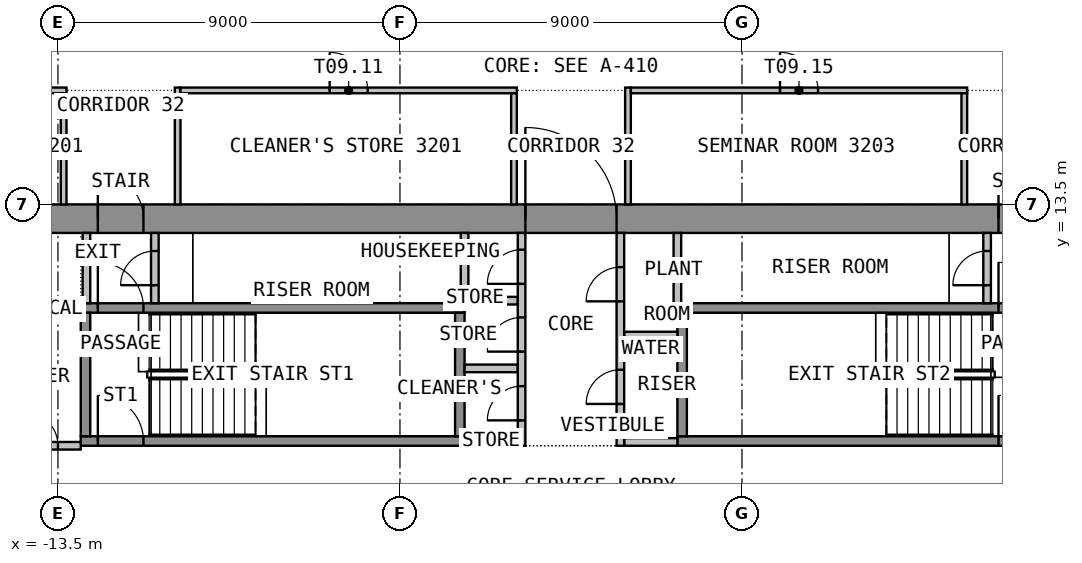
"""IFC4 building model, lengths in metres.
Left out: names, types, materials, properties, quantities, classifications, styles, units other than length and angle.
Written with IfcOpenShell. Run it as: python <this file> out.ifc"""

import sys

from ifc_helpers import new_model, si_unit, direction, frame, frame_2d, origin, place, context, subcontext, project, spatial, rectangle, extrude, element, fill, save


model = new_model("IFC4")
c1 = context("Model", 3, precision=1e-05, world=origin(), true_north=direction((0.0, 1.0)))
c2 = subcontext(c1, "Body", "Model", "MODEL_VIEW")
j1 = project(units=[si_unit("LENGTHUNIT", "METRE"), si_unit("PLANEANGLEUNIT", "RADIAN")], contexts=[c1])
p1 = place(None, origin())
s1 = spatial("IfcSite", under=j1, at=p1, CompositionType="ELEMENT")
p2 = place(p1, origin())
s2 = spatial("IfcBuilding", under=s1, at=p2, CompositionType="ELEMENT")
p3 = place(p2, frame((0.0, 0.0, 132.6)))
s3 = spatial("IfcBuildingStorey", under=s2, at=p3, CompositionType="ELEMENT", Elevation=132.6)
p4 = place(p3, frame((-15.75, 13.125, 0.0), z_axis=(0.0, 0.0, 1.0), x_axis=(1.0, 0.0, 0.0)))
e1 = element("IfcWall", 1, at=p4, inside=s3, PredefinedType="SHEAR", context=c2, shape_type="SweptSolid", body=[
    extrude(rectangle(XDim=31.5, YDim=0.75, at=frame_2d((15.75, 0.0))), origin(), (0.0, 0.0, 1.0), 3.575),
])
p5 = place(p4, frame((14.55, 0.0, 0.0)))
e2 = element("IfcOpeningElement", 2, at=p5, cuts=e1, PredefinedType="OPENING", context=c2, shape_type="SweptSolid", body=[
    extrude(rectangle(XDim=2.4, YDim=2.1, at=frame_2d((1.2, 1.05))), frame((0.0, 0.385, 0.0), z_axis=(0.0, -1.0, 0.0), x_axis=(1.0, 0.0, 0.0)), (0.0, 0.0, 1.0), 0.77),
])
p6 = place(p4, frame((3.3, 0.0, 0.0)))
e3 = element("IfcOpeningElement", 3, at=p6, cuts=e1, PredefinedType="OPENING", context=c2, shape_type="SweptSolid", body=[
    extrude(rectangle(XDim=1.2, YDim=2.1, at=frame_2d((0.6, 1.05))), frame((0.0, 0.385, 0.0), z_axis=(0.0, -1.0, 0.0), x_axis=(1.0, 0.0, 0.0)), (0.0, 0.0, 1.0), 0.77),
])
p7 = place(p4, frame((27.0, 0.0, 0.0)))
e4 = element("IfcOpeningElement", 4, at=p7, cuts=e1, PredefinedType="OPENING", context=c2, shape_type="SweptSolid", body=[
    extrude(rectangle(XDim=1.2, YDim=2.1, at=frame_2d((0.6, 1.05))), frame((0.0, 0.385, 0.0), z_axis=(0.0, -1.0, 0.0), x_axis=(1.0, 0.0, 0.0)), (0.0, 0.0, 1.0), 0.77),
])
p8 = place(p3, frame((-12.9, 7.275, 0.0), z_axis=(0.0, 0.0, 1.0), x_axis=(1.0, 0.0, 0.0)))
e5 = element("IfcWall", 5, at=p8, inside=s3, PredefinedType="SHEAR", context=c2, shape_type="SweptSolid", body=[
    extrude(rectangle(XDim=10.1, YDim=0.25, at=frame_2d((5.05, 0.0))), origin(), (0.0, 0.0, 1.0), 3.575),
])
p9 = place(p8, frame((0.45, 0.0, 0.0)))
e6 = element("IfcOpeningElement", 6, at=p9, cuts=e5, PredefinedType="OPENING", context=c2, shape_type="SweptSolid", body=[
    extrude(rectangle(XDim=1.2, YDim=2.1, at=frame_2d((0.6, 1.05))), frame((0.0, 0.135, 0.0), z_axis=(0.0, -1.0, 0.0), x_axis=(1.0, 0.0, 0.0)), (0.0, 0.0, 1.0), 0.27),
])
p10 = place(p3, frame((-12.9, 10.775, 0.0), z_axis=(0.0, 0.0, 1.0), x_axis=(1.0, 0.0, 0.0)))
e7 = element("IfcWall", 7, at=p10, inside=s3, PredefinedType="SHEAR", context=c2, shape_type="SweptSolid", body=[
    extrude(rectangle(XDim=10.1, YDim=0.25, at=frame_2d((5.05, 0.0))), origin(), (0.0, 0.0, 1.0), 3.575),
])
p11 = place(p10, frame((0.45, 0.0, 0.0)))
e8 = element("IfcOpeningElement", 8, at=p11, cuts=e7, PredefinedType="OPENING", context=c2, shape_type="SweptSolid", body=[
    extrude(rectangle(XDim=1.2, YDim=2.1, at=frame_2d((0.6, 1.05))), frame((0.0, 0.135, 0.0), z_axis=(0.0, -1.0, 0.0), x_axis=(1.0, 0.0, 0.0)), (0.0, 0.0, 1.0), 0.27),
])
for number, where, z_axis, x_axis in (
    (9, (-12.775, 7.4, 0.0), (0.0, 0.0, 1.0), (0.0, 1.0, 0.0)),
    (10, (-2.925, 7.4, 0.0), (0.0, 0.0, 1.0), (0.0, 1.0, 0.0)),
):
    element("IfcWall", number, at=place(p3, frame(where, z_axis=z_axis, x_axis=x_axis)), inside=s3, PredefinedType="SHEAR", context=c2, shape_type="SweptSolid", body=[
        extrude(rectangle(XDim=3.25, YDim=0.25, at=frame_2d((1.625, 0.0))), origin(), (0.0, 0.0, 1.0), 3.575),
    ])
p12 = place(p3, frame((2.8, 7.275, 0.0), z_axis=(0.0, 0.0, 1.0), x_axis=(1.0, 0.0, 0.0)))
e11 = element("IfcWall", 11, at=p12, inside=s3, PredefinedType="SHEAR", context=c2, shape_type="SweptSolid", body=[
    extrude(rectangle(XDim=10.1, YDim=0.25, at=frame_2d((5.05, 0.0))), origin(), (0.0, 0.0, 1.0), 3.575),
])
p13 = place(p12, frame((8.45, 0.0, 0.0)))
e12 = element("IfcOpeningElement", 12, at=p13, cuts=e11, PredefinedType="OPENING", context=c2, shape_type="SweptSolid", body=[
    extrude(rectangle(XDim=1.2, YDim=2.1, at=frame_2d((0.6, 1.05))), frame((0.0, 0.135, 0.0), z_axis=(0.0, -1.0, 0.0), x_axis=(1.0, 0.0, 0.0)), (0.0, 0.0, 1.0), 0.27),
])
p14 = place(p3, frame((2.8, 10.775, 0.0), z_axis=(0.0, 0.0, 1.0), x_axis=(1.0, 0.0, 0.0)))
e13 = element("IfcWall", 13, at=p14, inside=s3, PredefinedType="SHEAR", context=c2, shape_type="SweptSolid", body=[
    extrude(rectangle(XDim=10.1, YDim=0.25, at=frame_2d((5.05, 0.0))), origin(), (0.0, 0.0, 1.0), 3.575),
])
p15 = place(p14, frame((8.45, 0.0, 0.0)))
e14 = element("IfcOpeningElement", 14, at=p15, cuts=e13, PredefinedType="OPENING", context=c2, shape_type="SweptSolid", body=[
    extrude(rectangle(XDim=1.2, YDim=2.1, at=frame_2d((0.6, 1.05))), frame((0.0, 0.135, 0.0), z_axis=(0.0, -1.0, 0.0), x_axis=(1.0, 0.0, 0.0)), (0.0, 0.0, 1.0), 0.27),
])
p16 = place(p3, frame((2.925, 7.4, 0.0), z_axis=(0.0, 0.0, 1.0), x_axis=(0.0, 1.0, 0.0)))
e15 = element("IfcWall", 15, at=p16, inside=s3, PredefinedType="SHEAR", context=c2, shape_type="SweptSolid", body=[
    extrude(rectangle(XDim=3.25, YDim=0.25, at=frame_2d((1.625, 0.0))), origin(), (0.0, 0.0, 1.0), 3.575),
])
for number, where, z_axis, x_axis in (
    (16, (-2.8, 7.25, 0.0), (0.0, 0.0, 1.0), (1.0, 0.0, 0.0)),
    (17, (-2.8, 9.186, 0.0), (0.0, 0.0, 1.0), (1.0, 0.0, 0.0)),
    (18, (-2.8, 10.968, 0.0), (0.0, 0.0, 1.0), (1.0, 0.0, 0.0)),
    (19, (1.4, 7.25, 0.0), (0.0, 0.0, 1.0), (1.0, 0.0, 0.0)),
    (20, (1.4, 10.05, 0.0), (0.0, 0.0, 1.0), (1.0, 0.0, 0.0)),
):
    element("IfcWall", number, at=place(p3, frame(where, z_axis=z_axis, x_axis=x_axis)), inside=s3, PredefinedType="PARTITIONING", context=c2, shape_type="SweptSolid", body=[
        extrude(rectangle(XDim=1.4, YDim=0.2, at=frame_2d((0.7, 0.0))), origin(), (0.0, 0.0, 1.0), 3.575),
    ])
p17 = place(p3, frame((-1.3, 7.15, 0.0), z_axis=(0.0, 0.0, 1.0), x_axis=(0.0, 1.0, 0.0)))
e21 = element("IfcWall", 21, at=p17, inside=s3, PredefinedType="PARTITIONING", context=c2, shape_type="SweptSolid", body=[
    extrude(rectangle(XDim=5.6, YDim=0.2, at=frame_2d((2.8, 0.0))), origin(), (0.0, 0.0, 1.0), 3.575),
])
p18 = place(p17, frame((0.668, 0.0, 0.0)))
e22 = element("IfcOpeningElement", 22, at=p18, cuts=e21, PredefinedType="OPENING", context=c2, shape_type="SweptSolid", body=[
    extrude(rectangle(XDim=0.9, YDim=2.1, at=frame_2d((0.45, 1.05))), frame((0.0, 0.11, 0.0), z_axis=(0.0, -1.0, 0.0), x_axis=(1.0, 0.0, 0.0)), (0.0, 0.0, 1.0), 0.22),
])
p19 = place(p17, frame((2.477, 0.0, 0.0)))
e23 = element("IfcOpeningElement", 23, at=p19, cuts=e21, PredefinedType="OPENING", context=c2, shape_type="SweptSolid", body=[
    extrude(rectangle(XDim=0.9, YDim=2.1, at=frame_2d((0.45, 1.05))), frame((0.0, 0.11, 0.0), z_axis=(0.0, -1.0, 0.0), x_axis=(1.0, 0.0, 0.0)), (0.0, 0.0, 1.0), 0.22),
])
p20 = place(p17, frame((4.259, 0.0, 0.0)))
e24 = element("IfcOpeningElement", 24, at=p20, cuts=e21, PredefinedType="OPENING", context=c2, shape_type="SweptSolid", body=[
    extrude(rectangle(XDim=0.9, YDim=2.1, at=frame_2d((0.45, 1.05))), frame((0.0, 0.11, 0.0), z_axis=(0.0, -1.0, 0.0), x_axis=(1.0, 0.0, 0.0)), (0.0, 0.0, 1.0), 0.22),
])
p21 = place(p3, frame((1.3, 7.15, 0.0), z_axis=(0.0, 0.0, 1.0), x_axis=(0.0, 1.0, 0.0)))
e25 = element("IfcWall", 25, at=p21, inside=s3, PredefinedType="PARTITIONING", context=c2, shape_type="SweptSolid", body=[
    extrude(rectangle(XDim=5.6, YDim=0.2, at=frame_2d((2.8, 0.0))), origin(), (0.0, 0.0, 1.0), 3.575),
])
p22 = place(p21, frame((1.1, 0.0, 0.0)))
e26 = element("IfcOpeningElement", 26, at=p22, cuts=e25, PredefinedType="OPENING", context=c2, shape_type="SweptSolid", body=[
    extrude(rectangle(XDim=0.9, YDim=2.1, at=frame_2d((0.45, 1.05))), frame((0.0, 0.11, 0.0), z_axis=(0.0, -1.0, 0.0), x_axis=(1.0, 0.0, 0.0)), (0.0, 0.0, 1.0), 0.22),
])
p23 = place(p21, frame((3.8, 0.0, 0.0)))
e27 = element("IfcOpeningElement", 27, at=p23, cuts=e25, PredefinedType="OPENING", context=c2, shape_type="SweptSolid", body=[
    extrude(rectangle(XDim=0.9, YDim=2.1, at=frame_2d((0.45, 1.05))), frame((0.0, 0.11, 0.0), z_axis=(0.0, -1.0, 0.0), x_axis=(1.0, 0.0, 0.0)), (0.0, 0.0, 1.0), 0.22),
])
p24 = place(p3, frame((-12.75, 10.9, 0.0), z_axis=(0.0, 0.0, 1.0), x_axis=(0.0, 1.0, 0.0)))
e28 = element("IfcWall", 28, at=p24, inside=s3, PredefinedType="PARTITIONING", context=c2, shape_type="SweptSolid", body=[
    extrude(rectangle(XDim=1.85, YDim=0.2, at=frame_2d((0.925, 0.0))), origin(), (0.0, 0.0, 1.0), 3.575),
])
p25 = place(p3, frame((-10.95, 10.9, 0.0), z_axis=(0.0, 0.0, 1.0), x_axis=(0.0, 1.0, 0.0)))
e29 = element("IfcWall", 29, at=p25, inside=s3, PredefinedType="PARTITIONING", context=c2, shape_type="SweptSolid", body=[
    extrude(rectangle(XDim=1.85, YDim=0.2, at=frame_2d((0.925, 0.0))), origin(), (0.0, 0.0, 1.0), 3.575),
])
p26 = place(p25, frame((0.475, 0.0, 0.0)))
e30 = element("IfcOpeningElement", 30, at=p26, cuts=e29, PredefinedType="OPENING", context=c2, shape_type="SweptSolid", body=[
    extrude(rectangle(XDim=0.9, YDim=2.1, at=frame_2d((0.45, 1.05))), frame((0.0, 0.11, 0.0), z_axis=(0.0, -1.0, 0.0), x_axis=(1.0, 0.0, 0.0)), (0.0, 0.0, 1.0), 0.22),
])
p27 = place(p3, frame((10.95, 10.9, 0.0), z_axis=(0.0, 0.0, 1.0), x_axis=(0.0, 1.0, 0.0)))
e31 = element("IfcWall", 31, at=p27, inside=s3, PredefinedType="PARTITIONING", context=c2, shape_type="SweptSolid", body=[
    extrude(rectangle(XDim=1.85, YDim=0.2, at=frame_2d((0.925, 0.0))), origin(), (0.0, 0.0, 1.0), 3.575),
])
p28 = place(p27, frame((0.475, 0.0, 0.0)))
e32 = element("IfcOpeningElement", 32, at=p28, cuts=e31, PredefinedType="OPENING", context=c2, shape_type="SweptSolid", body=[
    extrude(rectangle(XDim=0.9, YDim=2.1, at=frame_2d((0.45, 1.05))), frame((0.0, 0.11, 0.0), z_axis=(0.0, -1.0, 0.0), x_axis=(1.0, 0.0, 0.0)), (0.0, 0.0, 1.0), 0.22),
])
p29 = place(p3, frame((-15.0, 7.15, 0.0), z_axis=(0.0, 0.0, 1.0), x_axis=(1.0, 0.0, 0.0)))
e33 = element("IfcWall", 33, at=p29, inside=s3, PredefinedType="PARTITIONING", context=c2, shape_type="SweptSolid", body=[
    extrude(rectangle(XDim=2.1, YDim=0.2, at=frame_2d((1.05, 0.0))), origin(), (0.0, 0.0, 1.0), 3.575),
])
p30 = place(p29, frame((0.6, 0.0, 0.0)))
e34 = element("IfcOpeningElement", 34, at=p30, cuts=e33, PredefinedType="OPENING", context=c2, shape_type="SweptSolid", body=[
    extrude(rectangle(XDim=0.9, YDim=2.1, at=frame_2d((0.45, 1.05))), frame((0.0, 0.11, 0.0), z_axis=(0.0, -1.0, 0.0), x_axis=(1.0, 0.0, 0.0)), (0.0, 0.0, 1.0), 0.22),
])
p31 = place(p3, frame((-18.675, 16.5, 0.0), z_axis=(0.0, 0.0, 1.0), x_axis=(1.0, 0.0, 0.0)))
e35 = element("IfcWall", 35, at=p31, inside=s3, PredefinedType="PARTITIONING", context=c2, shape_type="SweptSolid", body=[
    extrude(rectangle(XDim=5.4, YDim=0.15, at=frame_2d((2.7, 0.0))), origin(), (0.0, 0.0, 1.0), 3.575),
])
p32 = place(p31, frame((2.2, 0.0, 0.0)))
e36 = element("IfcOpeningElement", 36, at=p32, cuts=e35, PredefinedType="OPENING", context=c2, shape_type="SweptSolid", body=[
    extrude(rectangle(XDim=1.0, YDim=2.1, at=frame_2d((0.5, 1.05))), frame((0.0, 0.085, 0.0), z_axis=(0.0, -1.0, 0.0), x_axis=(1.0, 0.0, 0.0)), (0.0, 0.0, 1.0), 0.17),
])
p33 = place(p3, frame((-13.35, 16.425, 0.0), z_axis=(0.0, 0.0, 1.0), x_axis=(0.0, -1.0, 0.0)))
e37 = element("IfcWall", 37, at=p33, inside=s3, PredefinedType="PARTITIONING", context=c2, shape_type="SweptSolid", body=[
    extrude(rectangle(XDim=2.925, YDim=0.15, at=frame_2d((1.462, 0.0))), origin(), (0.0, 0.0, 1.0), 3.575),
])
p34 = place(p3, frame((-10.35, 13.5, 0.0), z_axis=(0.0, 0.0, 1.0), x_axis=(0.0, 1.0, 0.0)))
e38 = element("IfcWall", 38, at=p34, inside=s3, PredefinedType="PARTITIONING", context=c2, shape_type="SweptSolid", body=[
    extrude(rectangle(XDim=3.075, YDim=0.15, at=frame_2d((1.538, 0.0))), origin(), (0.0, 0.0, 1.0), 3.575),
])
p35 = place(p3, frame((-10.275, 16.5, 0.0), z_axis=(0.0, 0.0, 1.0), x_axis=(1.0, 0.0, 0.0)))
e39 = element("IfcWall", 39, at=p35, inside=s3, PredefinedType="PARTITIONING", context=c2, shape_type="SweptSolid", body=[
    extrude(rectangle(XDim=8.85, YDim=0.15, at=frame_2d((4.425, 0.0))), origin(), (0.0, 0.0, 1.0), 3.575),
])
p36 = place(p35, frame((3.925, 0.0, 0.0)))
e40 = element("IfcOpeningElement", 40, at=p36, cuts=e39, PredefinedType="OPENING", context=c2, shape_type="SweptSolid", body=[
    extrude(rectangle(XDim=1.0, YDim=2.1, at=frame_2d((0.5, 1.05))), frame((0.0, 0.085, 0.0), z_axis=(0.0, -1.0, 0.0), x_axis=(1.0, 0.0, 0.0)), (0.0, 0.0, 1.0), 0.17),
])
p37 = place(p3, frame((-1.5, 16.425, 0.0), z_axis=(0.0, 0.0, 1.0), x_axis=(0.0, -1.0, 0.0)))
e41 = element("IfcWall", 41, at=p37, inside=s3, PredefinedType="PARTITIONING", context=c2, shape_type="SweptSolid", body=[
    extrude(rectangle(XDim=2.925, YDim=0.15, at=frame_2d((1.462, 0.0))), origin(), (0.0, 0.0, 1.0), 3.575),
])
p38 = place(p3, frame((1.5, 13.5, 0.0), z_axis=(0.0, 0.0, 1.0), x_axis=(0.0, 1.0, 0.0)))
e42 = element("IfcWall", 42, at=p38, inside=s3, PredefinedType="PARTITIONING", context=c2, shape_type="SweptSolid", body=[
    extrude(rectangle(XDim=3.075, YDim=0.15, at=frame_2d((1.538, 0.0))), origin(), (0.0, 0.0, 1.0), 3.575),
])
p39 = place(p3, frame((1.575, 16.5, 0.0), z_axis=(0.0, 0.0, 1.0), x_axis=(1.0, 0.0, 0.0)))
e43 = element("IfcWall", 43, at=p39, inside=s3, PredefinedType="PARTITIONING", context=c2, shape_type="SweptSolid", body=[
    extrude(rectangle(XDim=8.85, YDim=0.15, at=frame_2d((4.425, 0.0))), origin(), (0.0, 0.0, 1.0), 3.575),
])
p40 = place(p39, frame((3.925, 0.0, 0.0)))
e44 = element("IfcOpeningElement", 44, at=p40, cuts=e43, PredefinedType="OPENING", context=c2, shape_type="SweptSolid", body=[
    extrude(rectangle(XDim=1.0, YDim=2.1, at=frame_2d((0.5, 1.05))), frame((0.0, 0.085, 0.0), z_axis=(0.0, -1.0, 0.0), x_axis=(1.0, 0.0, 0.0)), (0.0, 0.0, 1.0), 0.17),
])
p41 = place(p3, frame((10.35, 16.425, 0.0), z_axis=(0.0, 0.0, 1.0), x_axis=(0.0, -1.0, 0.0)))
e45 = element("IfcWall", 45, at=p41, inside=s3, PredefinedType="PARTITIONING", context=c2, shape_type="SweptSolid", body=[
    extrude(rectangle(XDim=2.925, YDim=0.15, at=frame_2d((1.462, 0.0))), origin(), (0.0, 0.0, 1.0), 3.575),
])
p42 = place(p3, frame((-2.8, 11.069, 0.0), z_axis=(0.0, 0.0, 1.0), x_axis=(0.0, 1.0, 0.0)))
e46 = element("IfcWall", 46, at=p42, inside=s3, PredefinedType="PARTITIONING", context=c2, shape_type="SweptSolid", body=[
    extrude(rectangle(XDim=1.68, YDim=0.2, at=frame_2d((0.84, 0.0))), origin(), (0.0, 0.0, 1.0), 3.575),
])
p43 = place(p3, frame((2.8, 12.749, 0.0), z_axis=(0.0, 0.0, 1.0), x_axis=(0.0, -1.0, 0.0)))
e47 = element("IfcWall", 47, at=p43, inside=s3, PredefinedType="PARTITIONING", context=c2, shape_type="SweptSolid", body=[
    extrude(rectangle(XDim=1.848, YDim=0.2, at=frame_2d((0.924, 0.0))), origin(), (0.0, 0.0, 1.0), 3.575),
])
p44 = place(p5, origin())
e48 = element("IfcDoor", 48, at=p44, inside=s3, OperationType="DOUBLE_DOOR_DOUBLE_SWING", PredefinedType="DOOR", context=c2, shape_type="SweptSolid", body=[
    extrude(rectangle(XDim=2.4, YDim=2.1, at=frame_2d((1.2, 1.05))), frame((0.0, 0.025, 0.0), z_axis=(0.0, -1.0, 0.0), x_axis=(1.0, 0.0, 0.0)), (0.0, 0.0, 1.0), 0.05),
])
fill(e2, e48)
p45 = place(p6, origin())
e49 = element("IfcDoor", 49, at=p45, inside=s3, OperationType="SINGLE_SWING_RIGHT", PredefinedType="DOOR", context=c2, shape_type="SweptSolid", body=[
    extrude(rectangle(XDim=1.2, YDim=2.1, at=frame_2d((0.6, 1.05))), frame((0.0, 0.025, 0.0), z_axis=(0.0, -1.0, 0.0), x_axis=(1.0, 0.0, 0.0)), (0.0, 0.0, 1.0), 0.05),
])
fill(e3, e49)
p46 = place(p7, origin())
e50 = element("IfcDoor", 50, at=p46, inside=s3, OperationType="SINGLE_SWING_RIGHT", PredefinedType="DOOR", context=c2, shape_type="SweptSolid", body=[
    extrude(rectangle(XDim=1.2, YDim=2.1, at=frame_2d((0.6, 1.05))), frame((0.0, 0.025, 0.0), z_axis=(0.0, -1.0, 0.0), x_axis=(1.0, 0.0, 0.0)), (0.0, 0.0, 1.0), 0.05),
])
fill(e4, e50)
p47 = place(p9, origin())
e51 = element("IfcDoor", 51, at=p47, inside=s3, OperationType="SINGLE_SWING_LEFT", PredefinedType="DOOR", context=c2, shape_type="SweptSolid", body=[
    extrude(rectangle(XDim=1.2, YDim=2.1, at=frame_2d((0.6, 1.05))), frame((0.0, 0.025, 0.0), z_axis=(0.0, -1.0, 0.0), x_axis=(1.0, 0.0, 0.0)), (0.0, 0.0, 1.0), 0.05),
])
fill(e6, e51)
p48 = place(p13, origin())
e52 = element("IfcDoor", 52, at=p48, inside=s3, OperationType="SINGLE_SWING_LEFT", PredefinedType="DOOR", context=c2, shape_type="SweptSolid", body=[
    extrude(rectangle(XDim=1.2, YDim=2.1, at=frame_2d((0.6, 1.05))), frame((0.0, 0.025, 0.0), z_axis=(0.0, -1.0, 0.0), x_axis=(1.0, 0.0, 0.0)), (0.0, 0.0, 1.0), 0.05),
])
fill(e12, e52)
p49 = place(p18, origin())
e53 = element("IfcDoor", 53, at=p49, inside=s3, OperationType="SINGLE_SWING_LEFT", PredefinedType="DOOR", context=c2, shape_type="SweptSolid", body=[
    extrude(rectangle(XDim=0.9, YDim=2.1, at=frame_2d((0.45, 1.05))), frame((0.0, 0.025, 0.0), z_axis=(0.0, -1.0, 0.0), x_axis=(1.0, 0.0, 0.0)), (0.0, 0.0, 1.0), 0.05),
])
fill(e22, e53)
p50 = place(p19, origin())
e54 = element("IfcDoor", 54, at=p50, inside=s3, OperationType="SINGLE_SWING_LEFT", PredefinedType="DOOR", context=c2, shape_type="SweptSolid", body=[
    extrude(rectangle(XDim=0.9, YDim=2.1, at=frame_2d((0.45, 1.05))), frame((0.0, 0.025, 0.0), z_axis=(0.0, -1.0, 0.0), x_axis=(1.0, 0.0, 0.0)), (0.0, 0.0, 1.0), 0.05),
])
fill(e23, e54)
p51 = place(p20, origin())
e55 = element("IfcDoor", 55, at=p51, inside=s3, OperationType="SINGLE_SWING_LEFT", PredefinedType="DOOR", context=c2, shape_type="SweptSolid", body=[
    extrude(rectangle(XDim=0.9, YDim=2.1, at=frame_2d((0.45, 1.05))), frame((0.0, 0.025, 0.0), z_axis=(0.0, -1.0, 0.0), x_axis=(1.0, 0.0, 0.0)), (0.0, 0.0, 1.0), 0.05),
])
fill(e24, e55)
p52 = place(p22, origin())
e56 = element("IfcDoor", 56, at=p52, inside=s3, OperationType="SINGLE_SWING_LEFT", PredefinedType="DOOR", context=c2, shape_type="SweptSolid", body=[
    extrude(rectangle(XDim=0.9, YDim=2.1, at=frame_2d((0.45, 1.05))), frame((0.0, 0.025, 0.0), z_axis=(0.0, -1.0, 0.0), x_axis=(1.0, 0.0, 0.0)), (0.0, 0.0, 1.0), 0.05),
])
fill(e26, e56)
p53 = place(p23, origin())
e57 = element("IfcDoor", 57, at=p53, inside=s3, OperationType="SINGLE_SWING_LEFT", PredefinedType="DOOR", context=c2, shape_type="SweptSolid", body=[
    extrude(rectangle(XDim=0.9, YDim=2.1, at=frame_2d((0.45, 1.05))), frame((0.0, 0.025, 0.0), z_axis=(0.0, -1.0, 0.0), x_axis=(1.0, 0.0, 0.0)), (0.0, 0.0, 1.0), 0.05),
])
fill(e27, e57)
p54 = place(p11, origin())
e58 = element("IfcDoor", 58, at=p54, inside=s3, OperationType="SINGLE_SWING_RIGHT", PredefinedType="DOOR", context=c2, shape_type="SweptSolid", body=[
    extrude(rectangle(XDim=1.2, YDim=2.1, at=frame_2d((0.6, 1.05))), frame((0.0, 0.025, 0.0), z_axis=(0.0, -1.0, 0.0), x_axis=(1.0, 0.0, 0.0)), (0.0, 0.0, 1.0), 0.05),
])
fill(e8, e58)
p55 = place(p26, origin())
e59 = element("IfcDoor", 59, at=p55, inside=s3, OperationType="SINGLE_SWING_LEFT", PredefinedType="DOOR", context=c2, shape_type="SweptSolid", body=[
    extrude(rectangle(XDim=0.9, YDim=2.1, at=frame_2d((0.45, 1.05))), frame((0.0, 0.025, 0.0), z_axis=(0.0, -1.0, 0.0), x_axis=(1.0, 0.0, 0.0)), (0.0, 0.0, 1.0), 0.05),
])
fill(e30, e59)
p56 = place(p15, origin())
e60 = element("IfcDoor", 60, at=p56, inside=s3, OperationType="SINGLE_SWING_RIGHT", PredefinedType="DOOR", context=c2, shape_type="SweptSolid", body=[
    extrude(rectangle(XDim=1.2, YDim=2.1, at=frame_2d((0.6, 1.05))), frame((0.0, 0.025, 0.0), z_axis=(0.0, -1.0, 0.0), x_axis=(1.0, 0.0, 0.0)), (0.0, 0.0, 1.0), 0.05),
])
fill(e14, e60)
p57 = place(p28, origin())
e61 = element("IfcDoor", 61, at=p57, inside=s3, OperationType="SINGLE_SWING_LEFT", PredefinedType="DOOR", context=c2, shape_type="SweptSolid", body=[
    extrude(rectangle(XDim=0.9, YDim=2.1, at=frame_2d((0.45, 1.05))), frame((0.0, 0.025, 0.0), z_axis=(0.0, -1.0, 0.0), x_axis=(1.0, 0.0, 0.0)), (0.0, 0.0, 1.0), 0.05),
])
fill(e32, e61)
p58 = place(p30, origin())
e62 = element("IfcDoor", 62, at=p58, inside=s3, OperationType="SINGLE_SWING_LEFT", PredefinedType="DOOR", context=c2, shape_type="SweptSolid", body=[
    extrude(rectangle(XDim=0.9, YDim=2.1, at=frame_2d((0.45, 1.05))), frame((0.0, 0.025, 0.0), z_axis=(0.0, -1.0, 0.0), x_axis=(1.0, 0.0, 0.0)), (0.0, 0.0, 1.0), 0.05),
])
fill(e34, e62)
p59 = place(p36, origin())
e63 = element("IfcDoor", 63, at=p59, inside=s3, OperationType="SINGLE_SWING_LEFT", PredefinedType="DOOR", context=c2, shape_type="SweptSolid", body=[
    extrude(rectangle(XDim=1.0, YDim=2.1, at=frame_2d((0.5, 1.05))), frame((0.0, 0.025, 0.0), z_axis=(0.0, -1.0, 0.0), x_axis=(1.0, 0.0, 0.0)), (0.0, 0.0, 1.0), 0.05),
])
fill(e40, e63)
p60 = place(p40, origin())
e64 = element("IfcDoor", 64, at=p60, inside=s3, OperationType="SINGLE_SWING_RIGHT", PredefinedType="DOOR", context=c2, shape_type="SweptSolid", body=[
    extrude(rectangle(XDim=1.0, YDim=2.1, at=frame_2d((0.5, 1.05))), frame((0.0, 0.025, 0.0), z_axis=(0.0, -1.0, 0.0), x_axis=(1.0, 0.0, 0.0)), (0.0, 0.0, 1.0), 0.05),
])
fill(e44, e64)
save(model, sys.argv[1])
